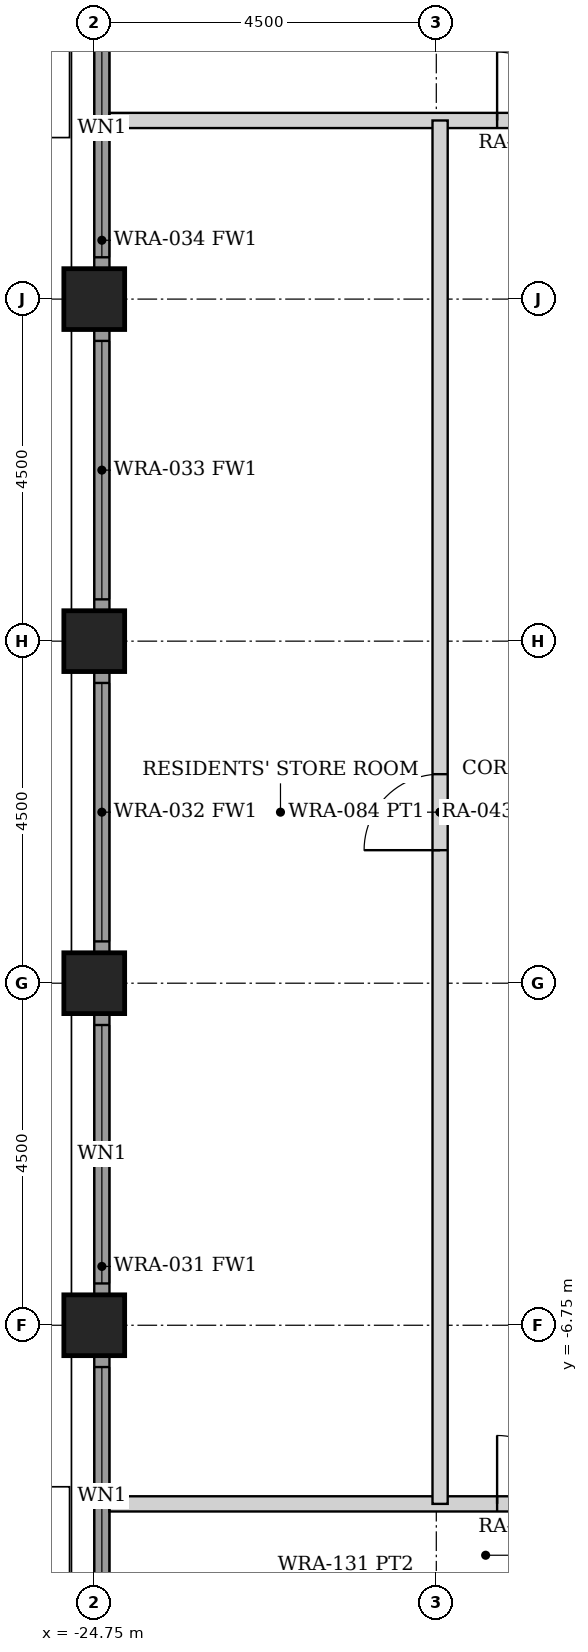
"""IFC4 building model, lengths in metres.
Left out: names, types, materials, properties, quantities, classifications, styles, units other than length and angle.
Written with IfcOpenShell. Run it as: python <this file> out.ifc"""

import sys

from ifc_helpers import new_model, si_unit, direction, frame, frame_2d, origin, origin_2d, place, context, subcontext, project, spatial, rectangle, hollow_rectangle, extrude, element, fill, save


model = new_model("IFC4")
c1 = context("Model", 3, precision=1e-05, world=origin(), true_north=direction((0.0, 1.0)))
c2 = subcontext(c1, "Body", "Model", "MODEL_VIEW")
j1 = project(units=[si_unit("LENGTHUNIT", "METRE"), si_unit("PLANEANGLEUNIT", "RADIAN")], contexts=[c1])
p1 = place(None, origin())
s1 = spatial("IfcSite", under=j1, at=p1, CompositionType="ELEMENT")
p2 = place(p1, origin())
s2 = spatial("IfcBuilding", under=s1, at=p2, CompositionType="ELEMENT")
p3 = place(p2, frame((0.0, 0.0, 26.5)))
s3 = spatial("IfcBuildingStorey", under=s2, at=p3, CompositionType="ELEMENT", Elevation=26.5)
for number, where, z_axis, x_axis in (
    (1, (-24.75, -6.75, 0.0), (0.0, 0.0, 1.0), (1.0, 0.0, 0.0)),
    (2, (-24.75, -2.25, 0.0), (0.0, 0.0, 1.0), (1.0, 0.0, 0.0)),
    (3, (-24.75, 2.25, 0.0), (0.0, 0.0, 1.0), (1.0, 0.0, 0.0)),
    (4, (-24.75, 6.75, 0.0), (0.0, 0.0, 1.0), (1.0, 0.0, 0.0)),
):
    element("IfcColumn", number, at=place(p3, frame(where, z_axis=z_axis, x_axis=x_axis)), inside=s3, PredefinedType="COLUMN", context=c2, shape_type="SweptSolid", body=[
        extrude(hollow_rectangle(XDim=0.8, YDim=0.8, WallThickness=0.08, at=origin_2d()), origin(), (0.0, 0.0, 1.0), 3.5),
    ])
p4 = place(p3, frame((-24.65, -10.845, 0.0), z_axis=(0.0, 0.0, 1.0), x_axis=(0.0, 1.0, 0.0)))
e5 = element("IfcWall", 5, at=p4, inside=s3, PredefinedType="SOLIDWALL", context=c2, shape_type="SweptSolid", body=[
    extrude(rectangle(XDim=3.69, YDim=0.2, at=frame_2d((1.845, 0.0))), origin(), (0.0, 0.0, 1.0), 2.379),
])
p5 = place(p4, frame((0.145, 0.0, 0.3)))
e6 = element("IfcOpeningElement", 6, at=p5, cuts=e5, PredefinedType="OPENING", context=c2, shape_type="SweptSolid", body=[
    extrude(rectangle(XDim=3.4, YDim=1.929, at=frame_2d((1.7, 0.964))), frame((0.0, 0.11, 0.0), z_axis=(0.0, -1.0, 0.0), x_axis=(1.0, 0.0, 0.0)), (0.0, 0.0, 1.0), 0.22),
])
p6 = place(p3, frame((-24.65, -6.345, 0.0), z_axis=(0.0, 0.0, 1.0), x_axis=(0.0, 1.0, 0.0)))
e7 = element("IfcWall", 7, at=p6, inside=s3, PredefinedType="SOLIDWALL", context=c2, shape_type="SweptSolid", body=[
    extrude(rectangle(XDim=3.69, YDim=0.2, at=frame_2d((1.845, 0.0))), origin(), (0.0, 0.0, 1.0), 2.379),
])
p7 = place(p6, frame((0.145, 0.0, 0.3)))
e8 = element("IfcOpeningElement", 8, at=p7, cuts=e7, PredefinedType="OPENING", context=c2, shape_type="SweptSolid", body=[
    extrude(rectangle(XDim=3.4, YDim=1.929, at=frame_2d((1.7, 0.964))), frame((0.0, 0.11, 0.0), z_axis=(0.0, -1.0, 0.0), x_axis=(1.0, 0.0, 0.0)), (0.0, 0.0, 1.0), 0.22),
])
p8 = place(p3, frame((-24.65, -1.845, 0.0), z_axis=(0.0, 0.0, 1.0), x_axis=(0.0, 1.0, 0.0)))
e9 = element("IfcWall", 9, at=p8, inside=s3, PredefinedType="SOLIDWALL", context=c2, shape_type="SweptSolid", body=[
    extrude(rectangle(XDim=3.69, YDim=0.2, at=frame_2d((1.845, 0.0))), origin(), (0.0, 0.0, 1.0), 2.379),
])
p9 = place(p8, frame((0.145, 0.0, 0.3)))
e10 = element("IfcOpeningElement", 10, at=p9, cuts=e9, PredefinedType="OPENING", context=c2, shape_type="SweptSolid", body=[
    extrude(rectangle(XDim=3.4, YDim=1.929, at=frame_2d((1.7, 0.964))), frame((0.0, 0.11, 0.0), z_axis=(0.0, -1.0, 0.0), x_axis=(1.0, 0.0, 0.0)), (0.0, 0.0, 1.0), 0.22),
])
p10 = place(p3, frame((-24.65, 2.655, 0.0), z_axis=(0.0, 0.0, 1.0), x_axis=(0.0, 1.0, 0.0)))
e11 = element("IfcWall", 11, at=p10, inside=s3, PredefinedType="SOLIDWALL", context=c2, shape_type="SweptSolid", body=[
    extrude(rectangle(XDim=3.69, YDim=0.2, at=frame_2d((1.845, 0.0))), origin(), (0.0, 0.0, 1.0), 2.379),
])
p11 = place(p10, frame((0.145, 0.0, 0.3)))
e12 = element("IfcOpeningElement", 12, at=p11, cuts=e11, PredefinedType="OPENING", context=c2, shape_type="SweptSolid", body=[
    extrude(rectangle(XDim=3.4, YDim=1.929, at=frame_2d((1.7, 0.964))), frame((0.0, 0.11, 0.0), z_axis=(0.0, -1.0, 0.0), x_axis=(1.0, 0.0, 0.0)), (0.0, 0.0, 1.0), 0.22),
])
p12 = place(p3, frame((-24.65, 7.155, 0.0), z_axis=(0.0, 0.0, 1.0), x_axis=(0.0, 1.0, 0.0)))
e13 = element("IfcWall", 13, at=p12, inside=s3, PredefinedType="SOLIDWALL", context=c2, shape_type="SweptSolid", body=[
    extrude(rectangle(XDim=3.69, YDim=0.2, at=frame_2d((1.845, 0.0))), origin(), (0.0, 0.0, 1.0), 2.379),
])
p13 = place(p12, frame((0.145, 0.0, 0.3)))
e14 = element("IfcOpeningElement", 14, at=p13, cuts=e13, PredefinedType="OPENING", context=c2, shape_type="SweptSolid", body=[
    extrude(rectangle(XDim=3.4, YDim=1.929, at=frame_2d((1.7, 0.964))), frame((0.0, 0.11, 0.0), z_axis=(0.0, -1.0, 0.0), x_axis=(1.0, 0.0, 0.0)), (0.0, 0.0, 1.0), 0.22),
])
p14 = place(p3, frame((-24.55, 9.1, 0.0), z_axis=(0.0, 0.0, 1.0), x_axis=(1.0, 0.0, 0.0)))
e15 = element("IfcWall", 15, at=p14, inside=s3, PredefinedType="PARTITIONING", context=c2, shape_type="SweptSolid", body=[
    extrude(rectangle(XDim=49.1, YDim=0.2, at=frame_2d((24.55, 0.0))), origin(), (0.0, 0.0, 1.0), 2.373),
])
p15 = place(p14, frame((5.1, 0.0, 0.0)))
e16 = element("IfcOpeningElement", 16, at=p15, cuts=e15, PredefinedType="OPENING", context=c2, shape_type="SweptSolid", body=[
    extrude(rectangle(XDim=0.9, YDim=2.1, at=frame_2d((0.45, 1.05))), frame((0.0, 0.11, 0.0), z_axis=(0.0, -1.0, 0.0), x_axis=(1.0, 0.0, 0.0)), (0.0, 0.0, 1.0), 0.22),
])
p16 = place(p14, frame((9.0, 0.0, 0.0)))
e17 = element("IfcOpeningElement", 17, at=p16, cuts=e15, PredefinedType="OPENING", context=c2, shape_type="SweptSolid", body=[
    extrude(rectangle(XDim=0.9, YDim=2.1, at=frame_2d((0.45, 1.05))), frame((0.0, 0.11, 0.0), z_axis=(0.0, -1.0, 0.0), x_axis=(1.0, 0.0, 0.0)), (0.0, 0.0, 1.0), 0.22),
])
p17 = place(p14, frame((13.5, 0.0, 0.0)))
e18 = element("IfcOpeningElement", 18, at=p17, cuts=e15, PredefinedType="OPENING", context=c2, shape_type="SweptSolid", body=[
    extrude(rectangle(XDim=0.9, YDim=2.1, at=frame_2d((0.45, 1.05))), frame((0.0, 0.11, 0.0), z_axis=(0.0, -1.0, 0.0), x_axis=(1.0, 0.0, 0.0)), (0.0, 0.0, 1.0), 0.22),
])
p18 = place(p14, frame((18.0, 0.0, 0.0)))
e19 = element("IfcOpeningElement", 19, at=p18, cuts=e15, PredefinedType="OPENING", context=c2, shape_type="SweptSolid", body=[
    extrude(rectangle(XDim=0.9, YDim=2.1, at=frame_2d((0.45, 1.05))), frame((0.0, 0.11, 0.0), z_axis=(0.0, -1.0, 0.0), x_axis=(1.0, 0.0, 0.0)), (0.0, 0.0, 1.0), 0.22),
])
p19 = place(p14, frame((22.5, 0.0, 0.0)))
e20 = element("IfcOpeningElement", 20, at=p19, cuts=e15, PredefinedType="OPENING", context=c2, shape_type="SweptSolid", body=[
    extrude(rectangle(XDim=0.9, YDim=2.1, at=frame_2d((0.45, 1.05))), frame((0.0, 0.11, 0.0), z_axis=(0.0, -1.0, 0.0), x_axis=(1.0, 0.0, 0.0)), (0.0, 0.0, 1.0), 0.22),
])
p20 = place(p14, frame((27.0, 0.0, 0.0)))
e21 = element("IfcOpeningElement", 21, at=p20, cuts=e15, PredefinedType="OPENING", context=c2, shape_type="SweptSolid", body=[
    extrude(rectangle(XDim=0.9, YDim=2.1, at=frame_2d((0.45, 1.05))), frame((0.0, 0.11, 0.0), z_axis=(0.0, -1.0, 0.0), x_axis=(1.0, 0.0, 0.0)), (0.0, 0.0, 1.0), 0.22),
])
p21 = place(p14, frame((31.5, 0.0, 0.0)))
e22 = element("IfcOpeningElement", 22, at=p21, cuts=e15, PredefinedType="OPENING", context=c2, shape_type="SweptSolid", body=[
    extrude(rectangle(XDim=0.9, YDim=2.1, at=frame_2d((0.45, 1.05))), frame((0.0, 0.11, 0.0), z_axis=(0.0, -1.0, 0.0), x_axis=(1.0, 0.0, 0.0)), (0.0, 0.0, 1.0), 0.22),
])
p22 = place(p14, frame((36.0, 0.0, 0.0)))
e23 = element("IfcOpeningElement", 23, at=p22, cuts=e15, PredefinedType="OPENING", context=c2, shape_type="SweptSolid", body=[
    extrude(rectangle(XDim=0.9, YDim=2.1, at=frame_2d((0.45, 1.05))), frame((0.0, 0.11, 0.0), z_axis=(0.0, -1.0, 0.0), x_axis=(1.0, 0.0, 0.0)), (0.0, 0.0, 1.0), 0.22),
])
p23 = place(p14, frame((43.1, 0.0, 0.0)))
e24 = element("IfcOpeningElement", 24, at=p23, cuts=e15, PredefinedType="OPENING", context=c2, shape_type="SweptSolid", body=[
    extrude(rectangle(XDim=0.9, YDim=2.1, at=frame_2d((0.45, 1.05))), frame((0.0, 0.11, 0.0), z_axis=(0.0, -1.0, 0.0), x_axis=(1.0, 0.0, 0.0)), (0.0, 0.0, 1.0), 0.22),
])
p24 = place(p3, frame((-24.55, -9.1, 0.0), z_axis=(0.0, 0.0, 1.0), x_axis=(1.0, 0.0, 0.0)))
e25 = element("IfcWall", 25, at=p24, inside=s3, PredefinedType="PARTITIONING", context=c2, shape_type="SweptSolid", body=[
    extrude(rectangle(XDim=49.1, YDim=0.2, at=frame_2d((24.55, 0.0))), origin(), (0.0, 0.0, 1.0), 2.373),
])
p25 = place(p24, frame((5.1, 0.0, 0.0)))
e26 = element("IfcOpeningElement", 26, at=p25, cuts=e25, PredefinedType="OPENING", context=c2, shape_type="SweptSolid", body=[
    extrude(rectangle(XDim=0.9, YDim=2.1, at=frame_2d((0.45, 1.05))), frame((0.0, 0.11, 0.0), z_axis=(0.0, -1.0, 0.0), x_axis=(1.0, 0.0, 0.0)), (0.0, 0.0, 1.0), 0.22),
])
p26 = place(p24, frame((9.0, 0.0, 0.0)))
e27 = element("IfcOpeningElement", 27, at=p26, cuts=e25, PredefinedType="OPENING", context=c2, shape_type="SweptSolid", body=[
    extrude(rectangle(XDim=0.9, YDim=2.1, at=frame_2d((0.45, 1.05))), frame((0.0, 0.11, 0.0), z_axis=(0.0, -1.0, 0.0), x_axis=(1.0, 0.0, 0.0)), (0.0, 0.0, 1.0), 0.22),
])
p27 = place(p24, frame((13.5, 0.0, 0.0)))
e28 = element("IfcOpeningElement", 28, at=p27, cuts=e25, PredefinedType="OPENING", context=c2, shape_type="SweptSolid", body=[
    extrude(rectangle(XDim=0.9, YDim=2.1, at=frame_2d((0.45, 1.05))), frame((0.0, 0.11, 0.0), z_axis=(0.0, -1.0, 0.0), x_axis=(1.0, 0.0, 0.0)), (0.0, 0.0, 1.0), 0.22),
])
p28 = place(p24, frame((18.0, 0.0, 0.0)))
e29 = element("IfcOpeningElement", 29, at=p28, cuts=e25, PredefinedType="OPENING", context=c2, shape_type="SweptSolid", body=[
    extrude(rectangle(XDim=0.9, YDim=2.1, at=frame_2d((0.45, 1.05))), frame((0.0, 0.11, 0.0), z_axis=(0.0, -1.0, 0.0), x_axis=(1.0, 0.0, 0.0)), (0.0, 0.0, 1.0), 0.22),
])
p29 = place(p24, frame((22.5, 0.0, 0.0)))
e30 = element("IfcOpeningElement", 30, at=p29, cuts=e25, PredefinedType="OPENING", context=c2, shape_type="SweptSolid", body=[
    extrude(rectangle(XDim=0.9, YDim=2.1, at=frame_2d((0.45, 1.05))), frame((0.0, 0.11, 0.0), z_axis=(0.0, -1.0, 0.0), x_axis=(1.0, 0.0, 0.0)), (0.0, 0.0, 1.0), 0.22),
])
p30 = place(p24, frame((27.0, 0.0, 0.0)))
e31 = element("IfcOpeningElement", 31, at=p30, cuts=e25, PredefinedType="OPENING", context=c2, shape_type="SweptSolid", body=[
    extrude(rectangle(XDim=0.9, YDim=2.1, at=frame_2d((0.45, 1.05))), frame((0.0, 0.11, 0.0), z_axis=(0.0, -1.0, 0.0), x_axis=(1.0, 0.0, 0.0)), (0.0, 0.0, 1.0), 0.22),
])
p31 = place(p24, frame((31.5, 0.0, 0.0)))
e32 = element("IfcOpeningElement", 32, at=p31, cuts=e25, PredefinedType="OPENING", context=c2, shape_type="SweptSolid", body=[
    extrude(rectangle(XDim=0.9, YDim=2.1, at=frame_2d((0.45, 1.05))), frame((0.0, 0.11, 0.0), z_axis=(0.0, -1.0, 0.0), x_axis=(1.0, 0.0, 0.0)), (0.0, 0.0, 1.0), 0.22),
])
p32 = place(p24, frame((36.0, 0.0, 0.0)))
e33 = element("IfcOpeningElement", 33, at=p32, cuts=e25, PredefinedType="OPENING", context=c2, shape_type="SweptSolid", body=[
    extrude(rectangle(XDim=0.9, YDim=2.1, at=frame_2d((0.45, 1.05))), frame((0.0, 0.11, 0.0), z_axis=(0.0, -1.0, 0.0), x_axis=(1.0, 0.0, 0.0)), (0.0, 0.0, 1.0), 0.22),
])
p33 = place(p24, frame((43.1, 0.0, 0.0)))
e34 = element("IfcOpeningElement", 34, at=p33, cuts=e25, PredefinedType="OPENING", context=c2, shape_type="SweptSolid", body=[
    extrude(rectangle(XDim=0.9, YDim=2.1, at=frame_2d((0.45, 1.05))), frame((0.0, 0.11, 0.0), z_axis=(0.0, -1.0, 0.0), x_axis=(1.0, 0.0, 0.0)), (0.0, 0.0, 1.0), 0.22),
])
p34 = place(p3, frame((-20.2, -9.1, 0.0), z_axis=(0.0, 0.0, 1.0), x_axis=(0.0, 1.0, 0.0)))
e35 = element("IfcWall", 35, at=p34, inside=s3, PredefinedType="PARTITIONING", context=c2, shape_type="SweptSolid", body=[
    extrude(rectangle(XDim=18.2, YDim=0.2, at=frame_2d((9.1, 0.0))), origin(), (0.0, 0.0, 1.0), 2.373),
])
p35 = place(p34, frame((8.6, 0.0, 0.0)))
e36 = element("IfcOpeningElement", 36, at=p35, cuts=e35, PredefinedType="OPENING", context=c2, shape_type="SweptSolid", body=[
    extrude(rectangle(XDim=1.0, YDim=2.1, at=frame_2d((0.5, 1.05))), frame((0.0, 0.11, 0.0), z_axis=(0.0, -1.0, 0.0), x_axis=(1.0, 0.0, 0.0)), (0.0, 0.0, 1.0), 0.22),
])
p36 = place(p5, origin())
e37 = element("IfcWindow", 37, at=p36, inside=s3, PartitioningType="SINGLE_PANEL", PredefinedType="WINDOW", context=c2, shape_type="SweptSolid", body=[
    extrude(rectangle(XDim=3.4, YDim=1.929, at=frame_2d((1.7, 0.964))), frame((0.0, 0.03, 0.0), z_axis=(0.0, -1.0, 0.0), x_axis=(1.0, 0.0, 0.0)), (0.0, 0.0, 1.0), 0.06),
])
fill(e6, e37)
p37 = place(p7, origin())
e38 = element("IfcWindow", 38, at=p37, inside=s3, PartitioningType="SINGLE_PANEL", PredefinedType="WINDOW", context=c2, shape_type="SweptSolid", body=[
    extrude(rectangle(XDim=3.4, YDim=1.929, at=frame_2d((1.7, 0.964))), frame((0.0, 0.03, 0.0), z_axis=(0.0, -1.0, 0.0), x_axis=(1.0, 0.0, 0.0)), (0.0, 0.0, 1.0), 0.06),
])
fill(e8, e38)
p38 = place(p9, origin())
e39 = element("IfcWindow", 39, at=p38, inside=s3, PartitioningType="SINGLE_PANEL", PredefinedType="WINDOW", context=c2, shape_type="SweptSolid", body=[
    extrude(rectangle(XDim=3.4, YDim=1.929, at=frame_2d((1.7, 0.964))), frame((0.0, 0.03, 0.0), z_axis=(0.0, -1.0, 0.0), x_axis=(1.0, 0.0, 0.0)), (0.0, 0.0, 1.0), 0.06),
])
fill(e10, e39)
p39 = place(p11, origin())
e40 = element("IfcWindow", 40, at=p39, inside=s3, PartitioningType="SINGLE_PANEL", PredefinedType="WINDOW", context=c2, shape_type="SweptSolid", body=[
    extrude(rectangle(XDim=3.4, YDim=1.929, at=frame_2d((1.7, 0.964))), frame((0.0, 0.03, 0.0), z_axis=(0.0, -1.0, 0.0), x_axis=(1.0, 0.0, 0.0)), (0.0, 0.0, 1.0), 0.06),
])
fill(e12, e40)
p40 = place(p13, origin())
e41 = element("IfcWindow", 41, at=p40, inside=s3, PartitioningType="SINGLE_PANEL", PredefinedType="WINDOW", context=c2, shape_type="SweptSolid", body=[
    extrude(rectangle(XDim=3.4, YDim=1.929, at=frame_2d((1.7, 0.964))), frame((0.0, 0.03, 0.0), z_axis=(0.0, -1.0, 0.0), x_axis=(1.0, 0.0, 0.0)), (0.0, 0.0, 1.0), 0.06),
])
fill(e14, e41)
p41 = place(p15, origin())
e42 = element("IfcDoor", 42, at=p41, inside=s3, OperationType="SINGLE_SWING_LEFT", PredefinedType="DOOR", context=c2, shape_type="SweptSolid", body=[
    extrude(rectangle(XDim=0.9, YDim=2.1, at=frame_2d((0.45, 1.05))), frame((0.0, 0.025, 0.0), z_axis=(0.0, -1.0, 0.0), x_axis=(1.0, 0.0, 0.0)), (0.0, 0.0, 1.0), 0.05),
])
fill(e16, e42)
p42 = place(p25, origin())
e43 = element("IfcDoor", 43, at=p42, inside=s3, OperationType="SINGLE_SWING_LEFT", PredefinedType="DOOR", context=c2, shape_type="SweptSolid", body=[
    extrude(rectangle(XDim=0.9, YDim=2.1, at=frame_2d((0.45, 1.05))), frame((0.0, 0.025, 0.0), z_axis=(0.0, -1.0, 0.0), x_axis=(1.0, 0.0, 0.0)), (0.0, 0.0, 1.0), 0.05),
])
fill(e26, e43)
p43 = place(p35, origin())
e44 = element("IfcDoor", 44, at=p43, inside=s3, OperationType="SINGLE_SWING_LEFT", PredefinedType="DOOR", context=c2, shape_type="SweptSolid", body=[
    extrude(rectangle(XDim=1.0, YDim=2.1, at=frame_2d((0.5, 1.05))), frame((0.0, 0.025, 0.0), z_axis=(0.0, -1.0, 0.0), x_axis=(1.0, 0.0, 0.0)), (0.0, 0.0, 1.0), 0.05),
])
fill(e36, e44)
save(model, sys.argv[1])
